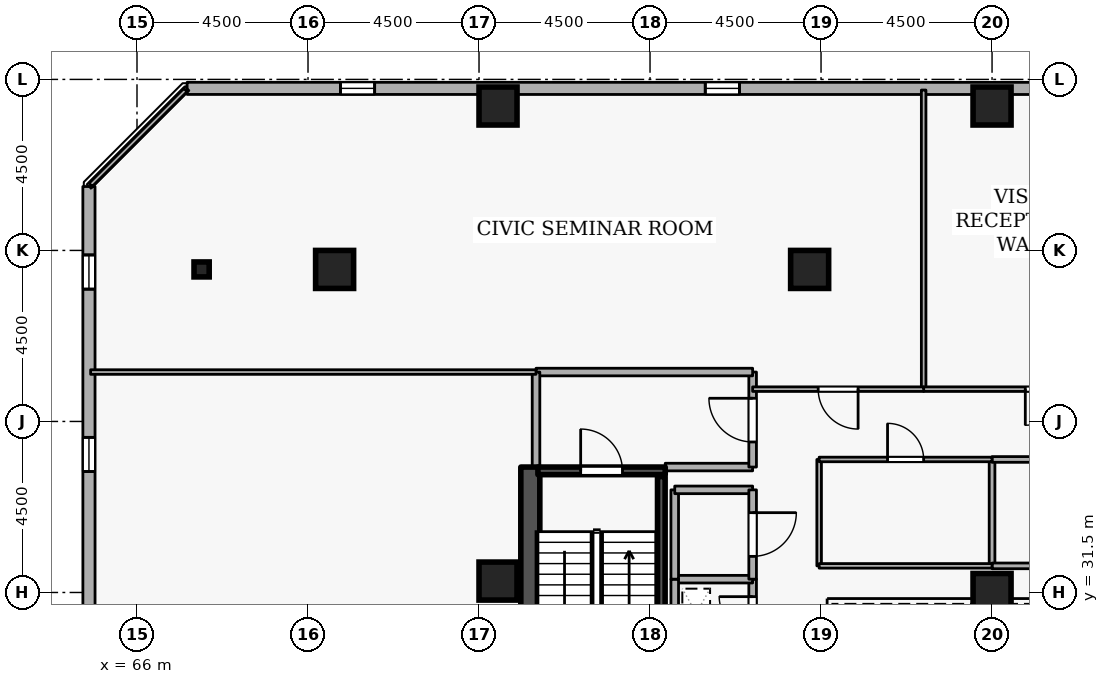
"""IFC4 building model, lengths in metres.
Left out: names, types, materials, properties, quantities, classifications, styles, units other than length and angle.
Written with IfcOpenShell. Run it as: python <this file> out.ifc"""

import sys

from ifc_helpers import new_model, si_unit, direction, frame, frame_2d, origin, origin_2d, place, context, subcontext, project, spatial, rectangle, i_section, extrude, element, fill, save


model = new_model("IFC4")
c1 = context("Model", 3, precision=1e-05, world=origin(), true_north=direction((0.0, 1.0)))
c2 = subcontext(c1, "Body", "Model", "MODEL_VIEW")
j1 = project(units=[si_unit("LENGTHUNIT", "METRE"), si_unit("PLANEANGLEUNIT", "RADIAN")], contexts=[c1])
p1 = place(None, origin())
s1 = spatial("IfcSite", under=j1, at=p1, CompositionType="ELEMENT")
p2 = place(p1, origin())
s2 = spatial("IfcBuilding", under=s1, at=p2, CompositionType="ELEMENT")
p3 = place(p2, frame((0.0, 0.0, 210.9)))
s3 = spatial("IfcBuildingStorey", under=s2, at=p3, CompositionType="ELEMENT", Elevation=210.9)
p4 = place(p3, frame((76.35, 19.2, 0.0), z_axis=(0.0, 0.0, 1.0), x_axis=(0.0, 1.0, 0.0)))
e1 = element("IfcWall", 1, at=p4, inside=s3, PredefinedType="SHEAR", context=c2, shape_type="SweptSolid", body=[
    extrude(rectangle(XDim=15.6, YDim=0.5, at=frame_2d((7.8, 0.0))), origin(), (0.0, 0.0, 1.0), 3.6),
])
for number, where, z_axis, x_axis in (
    (2, (88.5, 44.3, 0.0), (0.0, 0.0, 1.0), (1.0, 0.0, 0.0)),
    (3, (75.5, 44.3, 0.0), (0.0, 0.0, 1.0), (1.0, 0.0, 0.0)),
    (4, (71.2, 40.0, 0.0), (0.0, 0.0, 1.0), (1.0, 0.0, 0.0)),
    (5, (83.7, 40.0, 0.0), (0.0, 0.0, 1.0), (1.0, 0.0, 0.0)),
    (6, (75.5, 31.8, 0.0), (0.0, 0.0, 1.0), (1.0, 0.0, 0.0)),
    (7, (88.5, 31.5, 0.0), (0.0, 0.0, 1.0), (1.0, 0.0, 0.0)),
):
    element("IfcColumn", number, at=place(p3, frame(where, z_axis=z_axis, x_axis=x_axis)), inside=s3, PredefinedType="COLUMN", context=c2, shape_type="SweptSolid", body=[
        extrude(rectangle(XDim=1.0, YDim=1.0, at=origin_2d()), origin(), (0.0, 0.0, 1.0), 3.6),
    ])
p5 = place(p3, frame((67.7, 40.0, 0.0), z_axis=(0.0, 0.0, 1.0), x_axis=(1.0, 0.0, 0.0)))
e8 = element("IfcColumn", 8, at=p5, inside=s3, PredefinedType="COLUMN", context=c2, shape_type="SweptSolid", body=[
    extrude(i_section(OverallWidth=0.399, OverallDepth=0.394, WebThickness=0.023, FlangeThickness=0.037, FilletRadius=0.015, at=origin_2d()), origin(), (0.0, 0.0, 1.0), 3.6),
])
p6 = place(p3, frame((102.854, 44.762, 0.0), z_axis=(0.0, 0.0, 1.0), x_axis=(-0.999999997144, 7.5574884e-05, 0.0)))
e9 = element("IfcWall", 9, at=p6, inside=s3, PredefinedType="STANDARD", context=c2, shape_type="SweptSolid", body=[
    extrude(rectangle(XDim=35.535, YDim=0.32, at=frame_2d((17.768, 0.0))), origin(), (0.0, 0.0, 1.0), 2.7),
])
p7 = place(p6, frame((6.6, 0.0, 0.72)))
e10 = element("IfcOpeningElement", 10, at=p7, cuts=e9, PredefinedType="OPENING", context=c2, shape_type="SweptSolid", body=[
    extrude(rectangle(XDim=0.9, YDim=1.75, at=frame_2d((0.45, 0.875))), frame((0.0, 0.17, 0.0), z_axis=(0.0, -1.0, 0.0), x_axis=(1.0, 0.0, 0.0)), (0.0, 0.0, 1.0), 0.34),
])
p8 = place(p6, frame((11.4, 0.0, 0.72)))
e11 = element("IfcOpeningElement", 11, at=p8, cuts=e9, PredefinedType="OPENING", context=c2, shape_type="SweptSolid", body=[
    extrude(rectangle(XDim=0.9, YDim=1.75, at=frame_2d((0.45, 0.875))), frame((0.0, 0.17, 0.0), z_axis=(0.0, -1.0, 0.0), x_axis=(1.0, 0.0, 0.0)), (0.0, 0.0, 1.0), 0.34),
])
p9 = place(p6, frame((21.0, 0.0, 0.72)))
e12 = element("IfcOpeningElement", 12, at=p9, cuts=e9, PredefinedType="OPENING", context=c2, shape_type="SweptSolid", body=[
    extrude(rectangle(XDim=0.9, YDim=1.75, at=frame_2d((0.45, 0.875))), frame((0.0, 0.17, 0.0), z_axis=(0.0, -1.0, 0.0), x_axis=(1.0, 0.0, 0.0)), (0.0, 0.0, 1.0), 0.34),
])
p10 = place(p6, frame((30.6, 0.0, 0.72)))
e13 = element("IfcOpeningElement", 13, at=p10, cuts=e9, PredefinedType="OPENING", context=c2, shape_type="SweptSolid", body=[
    extrude(rectangle(XDim=0.9, YDim=1.75, at=frame_2d((0.45, 0.875))), frame((0.0, 0.17, 0.0), z_axis=(0.0, -1.0, 0.0), x_axis=(1.0, 0.0, 0.0)), (0.0, 0.0, 1.0), 0.34),
])
p11 = place(p3, frame((64.735, 42.181, 0.0), z_axis=(0.0, 0.0, 1.0), x_axis=(7.5574884e-05, -0.999999997144, 0.0)))
e14 = element("IfcWall", 14, at=p11, inside=s3, PredefinedType="STANDARD", context=c2, shape_type="SweptSolid", body=[
    extrude(rectangle(XDim=35.535, YDim=0.32, at=frame_2d((17.768, 0.0))), origin(), (0.0, 0.0, 1.0), 2.7),
])
p12 = place(p11, frame((1.8, 0.0, 0.72)))
e15 = element("IfcOpeningElement", 15, at=p12, cuts=e14, PredefinedType="OPENING", context=c2, shape_type="SweptSolid", body=[
    extrude(rectangle(XDim=0.9, YDim=1.75, at=frame_2d((0.45, 0.875))), frame((0.0, 0.17, 0.0), z_axis=(0.0, -1.0, 0.0), x_axis=(1.0, 0.0, 0.0)), (0.0, 0.0, 1.0), 0.34),
])
p13 = place(p11, frame((6.6, 0.0, 0.72)))
e16 = element("IfcOpeningElement", 16, at=p13, cuts=e14, PredefinedType="OPENING", context=c2, shape_type="SweptSolid", body=[
    extrude(rectangle(XDim=0.9, YDim=1.75, at=frame_2d((0.45, 0.875))), frame((0.0, 0.17, 0.0), z_axis=(0.0, -1.0, 0.0), x_axis=(1.0, 0.0, 0.0)), (0.0, 0.0, 1.0), 0.34),
])
p14 = place(p11, frame((11.4, 0.0, 0.72)))
e17 = element("IfcOpeningElement", 17, at=p14, cuts=e14, PredefinedType="OPENING", context=c2, shape_type="SweptSolid", body=[
    extrude(rectangle(XDim=0.9, YDim=1.75, at=frame_2d((0.45, 0.875))), frame((0.0, 0.17, 0.0), z_axis=(0.0, -1.0, 0.0), x_axis=(1.0, 0.0, 0.0)), (0.0, 0.0, 1.0), 0.34),
])
p15 = place(p11, frame((16.2, 0.0, 0.72)))
e18 = element("IfcOpeningElement", 18, at=p15, cuts=e14, PredefinedType="OPENING", context=c2, shape_type="SweptSolid", body=[
    extrude(rectangle(XDim=0.9, YDim=1.75, at=frame_2d((0.45, 0.875))), frame((0.0, 0.17, 0.0), z_axis=(0.0, -1.0, 0.0), x_axis=(1.0, 0.0, 0.0)), (0.0, 0.0, 1.0), 0.34),
])
p16 = place(p11, frame((21.0, 0.0, 0.72)))
e19 = element("IfcOpeningElement", 19, at=p16, cuts=e14, PredefinedType="OPENING", context=c2, shape_type="SweptSolid", body=[
    extrude(rectangle(XDim=0.9, YDim=1.75, at=frame_2d((0.45, 0.875))), frame((0.0, 0.17, 0.0), z_axis=(0.0, -1.0, 0.0), x_axis=(1.0, 0.0, 0.0)), (0.0, 0.0, 1.0), 0.34),
])
p17 = place(p11, frame((25.8, 0.0, 0.72)))
e20 = element("IfcOpeningElement", 20, at=p17, cuts=e14, PredefinedType="OPENING", context=c2, shape_type="SweptSolid", body=[
    extrude(rectangle(XDim=0.9, YDim=1.75, at=frame_2d((0.45, 0.875))), frame((0.0, 0.17, 0.0), z_axis=(0.0, -1.0, 0.0), x_axis=(1.0, 0.0, 0.0)), (0.0, 0.0, 1.0), 0.34),
])
p18 = place(p11, frame((30.6, 0.0, 0.72)))
e21 = element("IfcOpeningElement", 21, at=p18, cuts=e14, PredefinedType="OPENING", context=c2, shape_type="SweptSolid", body=[
    extrude(rectangle(XDim=0.9, YDim=1.75, at=frame_2d((0.45, 0.875))), frame((0.0, 0.17, 0.0), z_axis=(0.0, -1.0, 0.0), x_axis=(1.0, 0.0, 0.0)), (0.0, 0.0, 1.0), 0.34),
])
p19 = place(p3, frame((76.55, 34.7, 0.0), z_axis=(0.0, 0.0, 1.0), x_axis=(1.0, 0.0, 0.0)))
e22 = element("IfcWall", 22, at=p19, inside=s3, PredefinedType="SHEAR", context=c2, shape_type="SweptSolid", body=[
    extrude(rectangle(XDim=3.35, YDim=0.2, at=frame_2d((1.675, 0.0))), origin(), (0.0, 0.0, 1.0), 3.6),
])
p20 = place(p19, frame((1.125, 0.0, 0.0)))
e23 = element("IfcOpeningElement", 23, at=p20, cuts=e22, PredefinedType="OPENING", context=c2, shape_type="SweptSolid", body=[
    extrude(rectangle(XDim=1.1, YDim=2.1, at=frame_2d((0.55, 1.05))), frame((0.0, 0.11, 0.0), z_axis=(0.0, -1.0, 0.0), x_axis=(1.0, 0.0, 0.0)), (0.0, 0.0, 1.0), 0.22),
])
p21 = place(p3, frame((79.797, 27.45, 0.0), z_axis=(0.0, 0.0, 1.0), x_axis=(0.0, 1.0, 0.0)))
e24 = element("IfcWall", 24, at=p21, inside=s3, PredefinedType="SHEAR", context=c2, shape_type="SweptSolid", body=[
    extrude(rectangle(XDim=7.1, YDim=0.2, at=frame_2d((3.55, 0.0))), origin(), (0.0, 0.0, 1.0), 3.6),
])
p22 = place(p3, frame((79.9, 34.8, 0.0), z_axis=(0.0, 0.0, 1.0), x_axis=(1.0, 0.0, 0.0)))
e25 = element("IfcWall", 25, at=p22, inside=s3, PredefinedType="STANDARD", context=c2, shape_type="SweptSolid", body=[
    extrude(rectangle(XDim=2.3, YDim=0.2, at=frame_2d((1.15, 0.0))), origin(), (0.0, 0.0, 1.0), 2.545),
])
p23 = place(p3, frame((82.2, 34.8, 0.0), z_axis=(0.0, 0.0, 1.0), x_axis=(0.0, 1.0, 0.0)))
e26 = element("IfcWall", 26, at=p23, inside=s3, PredefinedType="STANDARD", context=c2, shape_type="SweptSolid", body=[
    extrude(rectangle(XDim=2.5, YDim=0.2, at=frame_2d((1.25, 0.0))), origin(), (0.0, 0.0, 1.0), 3.34),
])
p24 = place(p23, frame((0.66, 0.0, 0.0)))
e27 = element("IfcOpeningElement", 27, at=p24, cuts=e26, PredefinedType="OPENING", context=c2, shape_type="SweptSolid", body=[
    extrude(rectangle(XDim=1.15, YDim=2.1, at=frame_2d((0.575, 1.05))), frame((0.0, 0.11, 0.0), z_axis=(0.0, -1.0, 0.0), x_axis=(1.0, 0.0, 0.0)), (0.0, 0.0, 1.0), 0.22),
])
p25 = place(p3, frame((82.2, 37.3, 0.0), z_axis=(0.0, 0.0, 1.0), x_axis=(-1.0, 0.0, 0.0)))
e28 = element("IfcWall", 28, at=p25, inside=s3, PredefinedType="STANDARD", context=c2, shape_type="SweptSolid", body=[
    extrude(rectangle(XDim=5.7, YDim=0.2, at=frame_2d((2.85, 0.0))), origin(), (0.0, 0.0, 1.0), 3.34),
])
p26 = place(p3, frame((76.5, 37.3, 0.0), z_axis=(0.0, 0.0, 1.0), x_axis=(0.0, -1.0, 0.0)))
e29 = element("IfcWall", 29, at=p26, inside=s3, PredefinedType="STANDARD", context=c2, shape_type="SweptSolid", body=[
    extrude(rectangle(XDim=2.5, YDim=0.2, at=frame_2d((1.25, 0.0))), origin(), (0.0, 0.0, 1.0), 3.34),
])
p27 = place(p3, frame((82.2, 30.05, 0.0), z_axis=(0.0, 0.0, 1.0), x_axis=(0.0, 1.0, 0.0)))
e30 = element("IfcWall", 30, at=p27, inside=s3, PredefinedType="STANDARD", context=c2, shape_type="SweptSolid", body=[
    extrude(rectangle(XDim=1.8, YDim=0.2, at=frame_2d((0.9, 0.0))), origin(), (0.0, 0.0, 1.0), 3.34),
])
p28 = place(p27, frame((0.46, 0.0, 0.0)))
e31 = element("IfcOpeningElement", 31, at=p28, cuts=e30, PredefinedType="OPENING", context=c2, shape_type="SweptSolid", body=[
    extrude(rectangle(XDim=0.88, YDim=2.04, at=frame_2d((0.44, 1.02))), frame((0.0, 0.11, 0.0), z_axis=(0.0, -1.0, 0.0), x_axis=(1.0, 0.0, 0.0)), (0.0, 0.0, 1.0), 0.22),
])
p29 = place(p3, frame((82.2, 31.85, 0.0), z_axis=(0.0, 0.0, 1.0), x_axis=(-1.0, 0.0, 0.0)))
e32 = element("IfcWall", 32, at=p29, inside=s3, PredefinedType="STANDARD", context=c2, shape_type="SweptSolid", body=[
    extrude(rectangle(XDim=2.05, YDim=0.2, at=frame_2d((1.025, 0.0))), origin(), (0.0, 0.0, 1.0), 3.34),
])
p30 = place(p3, frame((80.15, 31.85, 0.0), z_axis=(0.0, 0.0, 1.0), x_axis=(0.0, -1.0, 0.0)))
e33 = element("IfcWall", 33, at=p30, inside=s3, PredefinedType="STANDARD", context=c2, shape_type="SweptSolid", body=[
    extrude(rectangle(XDim=1.8, YDim=0.2, at=frame_2d((0.9, 0.0))), origin(), (0.0, 0.0, 1.0), 3.34),
])
p31 = place(p3, frame((80.15, 31.85, 0.0), z_axis=(0.0, 0.0, 1.0), x_axis=(0.0, 1.0, 0.0)))
e34 = element("IfcWall", 34, at=p31, inside=s3, PredefinedType="STANDARD", context=c2, shape_type="SweptSolid", body=[
    extrude(rectangle(XDim=2.35, YDim=0.2, at=frame_2d((1.175, 0.0))), origin(), (0.0, 0.0, 1.0), 3.34),
])
p32 = place(p3, frame((80.15, 34.2, 0.0), z_axis=(0.0, 0.0, 1.0), x_axis=(1.0, 0.0, 0.0)))
e35 = element("IfcWall", 35, at=p32, inside=s3, PredefinedType="STANDARD", context=c2, shape_type="SweptSolid", body=[
    extrude(rectangle(XDim=2.05, YDim=0.2, at=frame_2d((1.025, 0.0))), origin(), (0.0, 0.0, 1.0), 2.545),
])
p33 = place(p3, frame((82.2, 34.2, 0.0), z_axis=(0.0, 0.0, 1.0), x_axis=(0.0, -1.0, 0.0)))
e36 = element("IfcWall", 36, at=p33, inside=s3, PredefinedType="STANDARD", context=c2, shape_type="SweptSolid", body=[
    extrude(rectangle(XDim=2.35, YDim=0.2, at=frame_2d((1.175, 0.0))), origin(), (0.0, 0.0, 1.0), 3.34),
])
p34 = place(p33, frame((0.6, 0.0, 0.0)))
e37 = element("IfcOpeningElement", 37, at=p34, cuts=e36, PredefinedType="OPENING", context=c2, shape_type="SweptSolid", body=[
    extrude(rectangle(XDim=1.15, YDim=2.1, at=frame_2d((0.575, 1.05))), frame((0.0, 0.11, 0.0), z_axis=(0.0, -1.0, 0.0), x_axis=(1.0, 0.0, 0.0)), (0.0, 0.0, 1.0), 0.22),
])
p35 = place(p3, frame((86.7, 36.85, 0.0), z_axis=(0.0, 0.0, 1.0), x_axis=(0.0, 1.0, 0.0)))
e38 = element("IfcWall", 38, at=p35, inside=s3, PredefinedType="PARTITIONING", context=c2, shape_type="SweptSolid", body=[
    extrude(rectangle(XDim=7.87, YDim=0.12, at=frame_2d((3.935, 0.0))), origin(), (0.0, 0.0, 1.0), 3.34),
])
p36 = place(p3, frame((93.0, 36.85, 0.0), z_axis=(0.0, 0.0, 1.0), x_axis=(-1.0, 0.0, 0.0)))
e39 = element("IfcWall", 39, at=p36, inside=s3, PredefinedType="PARTITIONING", context=c2, shape_type="SweptSolid", body=[
    extrude(rectangle(XDim=6.3, YDim=0.12, at=frame_2d((3.15, 0.0))), origin(), (0.0, 0.0, 1.0), 3.34),
])
p37 = place(p36, frame((2.675, 0.0, 0.0)))
e40 = element("IfcOpeningElement", 40, at=p37, cuts=e39, PredefinedType="OPENING", context=c2, shape_type="SweptSolid", body=[
    extrude(rectangle(XDim=0.95, YDim=2.1, at=frame_2d((0.475, 1.05))), frame((0.0, 0.07, 0.0), z_axis=(0.0, -1.0, 0.0), x_axis=(1.0, 0.0, 0.0)), (0.0, 0.0, 1.0), 0.14),
])
p38 = place(p3, frame((76.5, 37.3, 0.0), z_axis=(0.0, 0.0, 1.0), x_axis=(-1.0, 0.0, 0.0)))
e41 = element("IfcWall", 41, at=p38, inside=s3, PredefinedType="PARTITIONING", context=c2, shape_type="SweptSolid", body=[
    extrude(rectangle(XDim=11.72, YDim=0.12, at=frame_2d((5.86, 0.0))), origin(), (0.0, 0.0, 1.0), 3.34),
])
p39 = place(p3, frame((64.78, 42.225, 0.0), z_axis=(0.0, 0.0, 1.0), x_axis=(0.707106781187, 0.707106781187, 0.0)))
e42 = element("IfcWall", 42, at=p39, inside=s3, PredefinedType="PARTITIONING", context=c2, shape_type="SweptSolid", body=[
    extrude(rectangle(XDim=3.528, YDim=0.12, at=frame_2d((1.764, 0.0))), origin(), (0.0, 0.0, 1.0), 3.34),
])
p40 = place(p3, frame((86.7, 36.85, 0.0), z_axis=(0.0, 0.0, 1.0), x_axis=(-1.0, 0.0, 0.0)))
e43 = element("IfcWall", 43, at=p40, inside=s3, PredefinedType="PARTITIONING", context=c2, shape_type="SweptSolid", body=[
    extrude(rectangle(XDim=4.5, YDim=0.12, at=frame_2d((2.25, 0.0))), origin(), (0.0, 0.0, 1.0), 3.34),
])
p41 = place(p40, frame((1.725, 0.0, 0.0)))
e44 = element("IfcOpeningElement", 44, at=p41, cuts=e43, PredefinedType="OPENING", context=c2, shape_type="SweptSolid", body=[
    extrude(rectangle(XDim=1.05, YDim=2.1, at=frame_2d((0.525, 1.05))), frame((0.0, 0.07, 0.0), z_axis=(0.0, -1.0, 0.0), x_axis=(1.0, 0.0, 0.0)), (0.0, 0.0, 1.0), 0.14),
])
p42 = place(p3, frame((88.5, 32.2, 0.0), z_axis=(0.0, 0.0, 1.0), x_axis=(0.0, 1.0, 0.0)))
e45 = element("IfcWall", 45, at=p42, inside=s3, PredefinedType="PARTITIONING", context=c2, shape_type="SweptSolid", body=[
    extrude(rectangle(XDim=2.8, YDim=0.15, at=frame_2d((1.4, 0.0))), origin(), (0.0, 0.0, 1.0), 2.878),
])
p43 = place(p3, frame((88.5, 35.0, 0.0), z_axis=(0.0, 0.0, 1.0), x_axis=(1.0, 0.0, 0.0)))
e46 = element("IfcWall", 46, at=p43, inside=s3, PredefinedType="PARTITIONING", context=c2, shape_type="SweptSolid", body=[
    extrude(rectangle(XDim=4.55, YDim=0.15, at=frame_2d((2.275, 0.0))), origin(), (0.0, 0.0, 1.0), 3.34),
])
p44 = place(p43, frame((1.625, 0.0, 0.0)))
e47 = element("IfcOpeningElement", 47, at=p44, cuts=e46, PredefinedType="OPENING", context=c2, shape_type="SweptSolid", body=[
    extrude(rectangle(XDim=1.3, YDim=2.12, at=frame_2d((0.65, 1.06))), frame((0.0, 0.085, 0.0), z_axis=(0.0, -1.0, 0.0), x_axis=(1.0, 0.0, 0.0)), (0.0, 0.0, 1.0), 0.17),
])
p45 = place(p3, frame((93.05, 32.2, 0.0), z_axis=(0.0, 0.0, 1.0), x_axis=(-1.0, 0.0, 0.0)))
e48 = element("IfcWall", 48, at=p45, inside=s3, PredefinedType="PARTITIONING", context=c2, shape_type="SweptSolid", body=[
    extrude(rectangle(XDim=4.55, YDim=0.15, at=frame_2d((2.275, 0.0))), origin(), (0.0, 0.0, 1.0), 3.34),
])
p46 = place(p3, frame((83.95, 32.2, 0.0), z_axis=(0.0, 0.0, 1.0), x_axis=(0.0, 1.0, 0.0)))
e49 = element("IfcWall", 49, at=p46, inside=s3, PredefinedType="PARTITIONING", context=c2, shape_type="SweptSolid", body=[
    extrude(rectangle(XDim=2.8, YDim=0.12, at=frame_2d((1.4, 0.0))), origin(), (0.0, 0.0, 1.0), 3.34),
])
p47 = place(p3, frame((83.95, 35.0, 0.0), z_axis=(0.0, 0.0, 1.0), x_axis=(1.0, 0.0, 0.0)))
e50 = element("IfcWall", 50, at=p47, inside=s3, PredefinedType="PARTITIONING", context=c2, shape_type="SweptSolid", body=[
    extrude(rectangle(XDim=4.55, YDim=0.12, at=frame_2d((2.275, 0.0))), origin(), (0.0, 0.0, 1.0), 3.34),
])
p48 = place(p47, frame((1.8, 0.0, 0.0)))
e51 = element("IfcOpeningElement", 51, at=p48, cuts=e50, PredefinedType="OPENING", context=c2, shape_type="SweptSolid", body=[
    extrude(rectangle(XDim=0.95, YDim=2.1, at=frame_2d((0.475, 1.05))), frame((0.0, 0.07, 0.0), z_axis=(0.0, -1.0, 0.0), x_axis=(1.0, 0.0, 0.0)), (0.0, 0.0, 1.0), 0.14),
])
p49 = place(p3, frame((88.5, 32.2, 0.0), z_axis=(0.0, 0.0, 1.0), x_axis=(-1.0, 0.0, 0.0)))
e52 = element("IfcWall", 52, at=p49, inside=s3, PredefinedType="PARTITIONING", context=c2, shape_type="SweptSolid", body=[
    extrude(rectangle(XDim=4.55, YDim=0.12, at=frame_2d((2.275, 0.0))), origin(), (0.0, 0.0, 1.0), 3.34),
])
p50 = place(p9, origin())
e53 = element("IfcWindow", 53, at=p50, inside=s3, PartitioningType="SINGLE_PANEL", PredefinedType="WINDOW", context=c2, shape_type="SweptSolid", body=[
    extrude(rectangle(XDim=0.9, YDim=1.75, at=frame_2d((0.45, 0.875))), frame((0.0, 0.03, 0.0), z_axis=(0.0, -1.0, 0.0), x_axis=(1.0, 0.0, 0.0)), (0.0, 0.0, 1.0), 0.06),
])
fill(e12, e53)
p51 = place(p10, origin())
e54 = element("IfcWindow", 54, at=p51, inside=s3, PartitioningType="SINGLE_PANEL", PredefinedType="WINDOW", context=c2, shape_type="SweptSolid", body=[
    extrude(rectangle(XDim=0.9, YDim=1.75, at=frame_2d((0.45, 0.875))), frame((0.0, 0.03, 0.0), z_axis=(0.0, -1.0, 0.0), x_axis=(1.0, 0.0, 0.0)), (0.0, 0.0, 1.0), 0.06),
])
fill(e13, e54)
p52 = place(p12, origin())
e55 = element("IfcWindow", 55, at=p52, inside=s3, PartitioningType="SINGLE_PANEL", PredefinedType="WINDOW", context=c2, shape_type="SweptSolid", body=[
    extrude(rectangle(XDim=0.9, YDim=1.75, at=frame_2d((0.45, 0.875))), frame((0.0, 0.03, 0.0), z_axis=(0.0, -1.0, 0.0), x_axis=(1.0, 0.0, 0.0)), (0.0, 0.0, 1.0), 0.06),
])
fill(e15, e55)
p53 = place(p13, origin())
e56 = element("IfcWindow", 56, at=p53, inside=s3, PartitioningType="SINGLE_PANEL", PredefinedType="WINDOW", context=c2, shape_type="SweptSolid", body=[
    extrude(rectangle(XDim=0.9, YDim=1.75, at=frame_2d((0.45, 0.875))), frame((0.0, 0.03, 0.0), z_axis=(0.0, -1.0, 0.0), x_axis=(1.0, 0.0, 0.0)), (0.0, 0.0, 1.0), 0.06),
])
fill(e16, e56)
p54 = place(p20, origin())
e57 = element("IfcDoor", 57, at=p54, inside=s3, OperationType="SINGLE_SWING_LEFT", PredefinedType="DOOR", context=c2, shape_type="SweptSolid", body=[
    extrude(rectangle(XDim=1.1, YDim=2.1, at=frame_2d((0.55, 1.05))), frame((0.0, 0.025, 0.0), z_axis=(0.0, -1.0, 0.0), x_axis=(1.0, 0.0, 0.0)), (0.0, 0.0, 1.0), 0.05),
])
fill(e23, e57)
p55 = place(p24, origin())
e58 = element("IfcDoor", 58, at=p55, inside=s3, OperationType="SINGLE_SWING_RIGHT", PredefinedType="DOOR", context=c2, shape_type="SweptSolid", body=[
    extrude(rectangle(XDim=1.15, YDim=2.1, at=frame_2d((0.575, 1.05))), frame((0.0, 0.025, 0.0), z_axis=(0.0, -1.0, 0.0), x_axis=(1.0, 0.0, 0.0)), (0.0, 0.0, 1.0), 0.05),
])
fill(e27, e58)
p56 = place(p28, origin())
e59 = element("IfcDoor", 59, at=p56, inside=s3, OperationType="SINGLE_SWING_RIGHT", PredefinedType="DOOR", context=c2, shape_type="SweptSolid", body=[
    extrude(rectangle(XDim=0.88, YDim=2.04, at=frame_2d((0.44, 1.02))), frame((0.0, 0.025, 0.0), z_axis=(0.0, -1.0, 0.0), x_axis=(1.0, 0.0, 0.0)), (0.0, 0.0, 1.0), 0.05),
])
fill(e31, e59)
p57 = place(p34, origin())
e60 = element("IfcDoor", 60, at=p57, inside=s3, OperationType="SINGLE_SWING_LEFT", PredefinedType="DOOR", context=c2, shape_type="SweptSolid", body=[
    extrude(rectangle(XDim=1.15, YDim=2.1, at=frame_2d((0.575, 1.05))), frame((0.0, 0.025, 0.0), z_axis=(0.0, -1.0, 0.0), x_axis=(1.0, 0.0, 0.0)), (0.0, 0.0, 1.0), 0.05),
])
fill(e37, e60)
p58 = place(p37, origin())
e61 = element("IfcDoor", 61, at=p58, inside=s3, OperationType="SINGLE_SWING_RIGHT", PredefinedType="DOOR", context=c2, shape_type="SweptSolid", body=[
    extrude(rectangle(XDim=0.95, YDim=2.1, at=frame_2d((0.475, 1.05))), frame((0.0, 0.025, 0.0), z_axis=(0.0, -1.0, 0.0), x_axis=(1.0, 0.0, 0.0)), (0.0, 0.0, 1.0), 0.05),
])
fill(e40, e61)
p59 = place(p41, origin())
e62 = element("IfcDoor", 62, at=p59, inside=s3, OperationType="SINGLE_SWING_LEFT", PredefinedType="DOOR", context=c2, shape_type="SweptSolid", body=[
    extrude(rectangle(XDim=1.05, YDim=2.1, at=frame_2d((0.525, 1.05))), frame((0.0, 0.025, 0.0), z_axis=(0.0, -1.0, 0.0), x_axis=(1.0, 0.0, 0.0)), (0.0, 0.0, 1.0), 0.05),
])
fill(e44, e62)
p60 = place(p48, origin())
e63 = element("IfcDoor", 63, at=p60, inside=s3, OperationType="SINGLE_SWING_LEFT", PredefinedType="DOOR", context=c2, shape_type="SweptSolid", body=[
    extrude(rectangle(XDim=0.95, YDim=2.1, at=frame_2d((0.475, 1.05))), frame((0.0, 0.025, 0.0), z_axis=(0.0, -1.0, 0.0), x_axis=(1.0, 0.0, 0.0)), (0.0, 0.0, 1.0), 0.05),
])
fill(e51, e63)
save(model, sys.argv[1])
